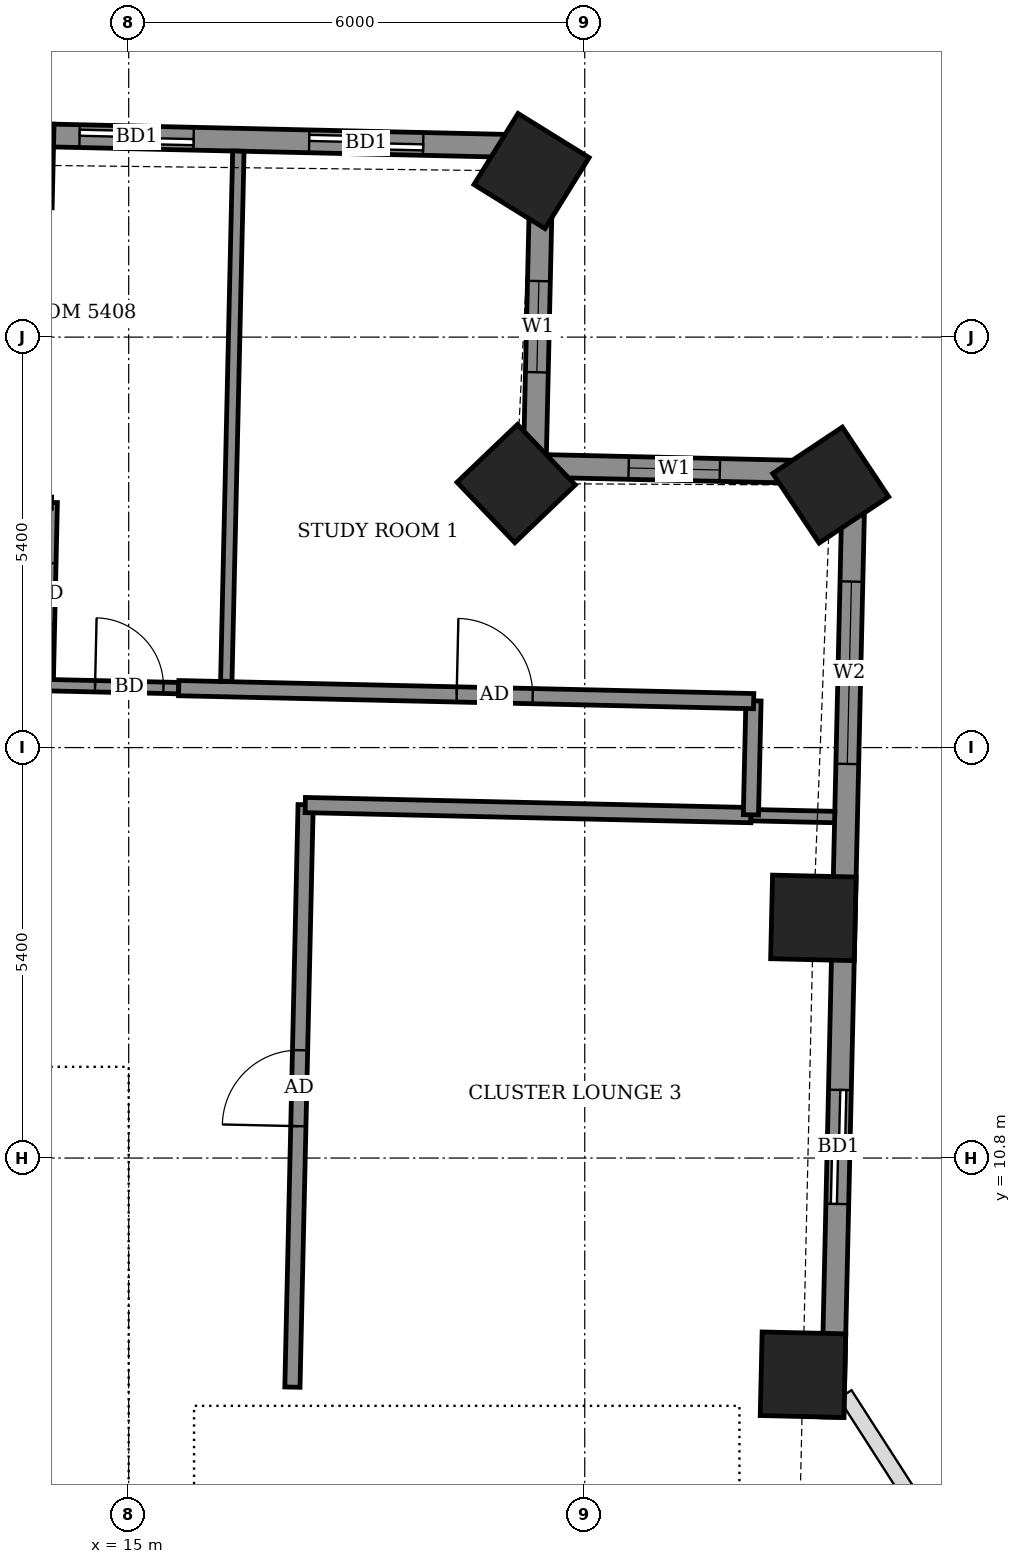
"""IFC4 building model, lengths in metres.
Left out: names, types, materials, properties, quantities, classifications, styles, units other than length and angle.
Written with IfcOpenShell. Run it as: python <this file> out.ifc"""

import sys

from ifc_helpers import new_model, si_unit, direction, frame, frame_2d, origin, origin_2d, place, context, subcontext, project, spatial, rectangle, extrude, element, fill, save


model = new_model("IFC4")
c1 = context("Model", 3, precision=1e-05, world=origin(), true_north=direction((0.0, 1.0)))
c2 = subcontext(c1, "Body", "Model", "MODEL_VIEW")
j1 = project(units=[si_unit("LENGTHUNIT", "METRE"), si_unit("PLANEANGLEUNIT", "RADIAN")], contexts=[c1])
p1 = place(None, origin())
s1 = spatial("IfcSite", under=j1, at=p1, CompositionType="ELEMENT")
p2 = place(p1, origin())
s2 = spatial("IfcBuilding", under=s1, at=p2, CompositionType="ELEMENT")
p3 = place(p2, frame((0.0, 0.0, 212.3)))
s3 = spatial("IfcBuildingStorey", under=s2, at=p3, CompositionType="ELEMENT", Elevation=212.3)
for number, where, z_axis, x_axis in (
    (1, (23.871, 7.949, -0.55), (0.0, 0.0, 1.0), (0.023, 1.0, 0.0)),
    (2, (24.008, 13.959, -0.55), (0.0, 0.0, 1.0), (0.023, 1.0, 0.0)),
    (3, (24.236, 19.653, -0.55), (0.0, 0.0, 1.0), (-0.554, 0.833, 0.0)),
    (4, (20.097, 19.673, -0.55), (0.0, 0.0, 1.0), (-0.691, 0.723, 0.0)),
    (5, (20.3, 23.785, -0.55), (0.0, 0.0, 1.0), (-0.85, 0.527, 0.0)),
    (6, (13.456, 23.864, -0.55), (0.0, 0.0, 1.0), (-1.0, 0.023, 0.0)),
):
    element("IfcColumn", number, at=place(p3, frame(where, z_axis=z_axis, x_axis=x_axis)), inside=s3, PredefinedType="COLUMN", context=c2, shape_type="SweptSolid", body=[
        extrude(rectangle(XDim=1.1, YDim=1.1, at=origin_2d()), origin(), (0.0, 0.0, 1.0), 3.6),
    ])
p4 = place(p3, frame((24.259, 7.391, 0.0), z_axis=(0.0, 0.0, 1.0), x_axis=(0.022696408441, 0.999742403344, 0.0)))
e7 = element("IfcWall", 7, at=p4, inside=s3, PredefinedType="SOLIDWALL", context=c2, shape_type="SweptSolid", body=[
    extrude(rectangle(XDim=12.424, YDim=0.3, at=frame_2d((6.212, 0.0))), origin(), (0.0, 0.0, 1.0), 2.55),
])
p5 = place(p4, frame((2.806, 0.0, 0.0)))
e8 = element("IfcOpeningElement", 8, at=p5, cuts=e7, PredefinedType="OPENING", context=c2, shape_type="SweptSolid", body=[
    extrude(rectangle(XDim=1.5, YDim=2.4, at=frame_2d((0.75, 1.2))), frame((0.0, 0.16, 0.0), z_axis=(0.0, -1.0, 0.0), x_axis=(1.0, 0.0, 0.0)), (0.0, 0.0, 1.0), 0.32),
])
p6 = place(p4, frame((8.596, 0.0, 0.9)))
e9 = element("IfcOpeningElement", 9, at=p6, cuts=e7, PredefinedType="OPENING", context=c2, shape_type="SweptSolid", body=[
    extrude(rectangle(XDim=2.4, YDim=1.5, at=frame_2d((1.2, 0.75))), frame((0.0, 0.16, 0.0), z_axis=(0.0, -1.0, 0.0), x_axis=(1.0, 0.0, 0.0)), (0.0, 0.0, 1.0), 0.32),
])
p7 = place(p3, frame((24.541, 19.812, 0.0), z_axis=(0.0, 0.0, 1.0), x_axis=(-0.999744320311, 0.022611811187, 0.0)))
e10 = element("IfcWall", 10, at=p7, inside=s3, PredefinedType="SOLIDWALL", context=c2, shape_type="SweptSolid", body=[
    extrude(rectangle(XDim=4.2, YDim=0.3, at=frame_2d((2.1, 0.0))), origin(), (0.0, 0.0, 1.0), 2.55),
])
p8 = place(p7, frame((1.764, 0.0, 0.9)))
e11 = element("IfcOpeningElement", 11, at=p8, cuts=e10, PredefinedType="OPENING", context=c2, shape_type="SweptSolid", body=[
    extrude(rectangle(XDim=1.2, YDim=1.5, at=frame_2d((0.6, 0.75))), frame((0.0, 0.16, 0.0), z_axis=(0.0, -1.0, 0.0), x_axis=(1.0, 0.0, 0.0)), (0.0, 0.0, 1.0), 0.32),
])
p9 = place(p3, frame((20.342, 19.907, 0.0), z_axis=(0.0, 0.0, 1.0), x_axis=(0.022611811187, 0.999744320311, 0.0)))
e12 = element("IfcWall", 12, at=p9, inside=s3, PredefinedType="SOLIDWALL", context=c2, shape_type="SweptSolid", body=[
    extrude(rectangle(XDim=4.2, YDim=0.3, at=frame_2d((2.1, 0.0))), origin(), (0.0, 0.0, 1.0), 2.55),
])
p10 = place(p9, frame((1.231, 0.0, 0.9)))
e13 = element("IfcOpeningElement", 13, at=p10, cuts=e12, PredefinedType="OPENING", context=c2, shape_type="SweptSolid", body=[
    extrude(rectangle(XDim=1.2, YDim=1.5, at=frame_2d((0.6, 0.75))), frame((0.0, 0.16, 0.0), z_axis=(0.0, -1.0, 0.0), x_axis=(1.0, 0.0, 0.0)), (0.0, 0.0, 1.0), 0.32),
])
p11 = place(p3, frame((20.437, 24.106, 0.0), z_axis=(0.0, 0.0, 1.0), x_axis=(-0.999742506232, 0.022691875925, 0.0)))
e14 = element("IfcWall", 14, at=p11, inside=s3, PredefinedType="SOLIDWALL", context=c2, shape_type="SweptSolid", body=[
    extrude(rectangle(XDim=42.444, YDim=0.3, at=frame_2d((21.222, 0.0))), origin(), (0.0, 0.0, 1.0), 2.55),
])
p12 = place(p11, frame((1.563, 0.0, 0.0)))
e15 = element("IfcOpeningElement", 15, at=p12, cuts=e14, PredefinedType="OPENING", context=c2, shape_type="SweptSolid", body=[
    extrude(rectangle(XDim=1.5, YDim=2.4, at=frame_2d((0.75, 1.2))), frame((0.0, 0.16, 0.0), z_axis=(0.0, -1.0, 0.0), x_axis=(1.0, 0.0, 0.0)), (0.0, 0.0, 1.0), 0.32),
])
p13 = place(p11, frame((4.584, 0.0, 0.0)))
e16 = element("IfcOpeningElement", 16, at=p13, cuts=e14, PredefinedType="OPENING", context=c2, shape_type="SweptSolid", body=[
    extrude(rectangle(XDim=1.5, YDim=2.4, at=frame_2d((0.75, 1.2))), frame((0.0, 0.16, 0.0), z_axis=(0.0, -1.0, 0.0), x_axis=(1.0, 0.0, 0.0)), (0.0, 0.0, 1.0), 0.32),
])
p14 = place(p11, frame((10.269, 0.0, 0.0)))
e17 = element("IfcOpeningElement", 17, at=p14, cuts=e14, PredefinedType="OPENING", context=c2, shape_type="SweptSolid", body=[
    extrude(rectangle(XDim=1.5, YDim=2.4, at=frame_2d((0.75, 1.2))), frame((0.0, 0.16, 0.0), z_axis=(0.0, -1.0, 0.0), x_axis=(1.0, 0.0, 0.0)), (0.0, 0.0, 1.0), 0.32),
])
p15 = place(p11, frame((15.271, 0.0, 0.0)))
e18 = element("IfcOpeningElement", 18, at=p15, cuts=e14, PredefinedType="OPENING", context=c2, shape_type="SweptSolid", body=[
    extrude(rectangle(XDim=1.5, YDim=2.4, at=frame_2d((0.75, 1.2))), frame((0.0, 0.16, 0.0), z_axis=(0.0, -1.0, 0.0), x_axis=(1.0, 0.0, 0.0)), (0.0, 0.0, 1.0), 0.32),
])
p16 = place(p11, frame((18.533, 0.0, 0.0)))
e19 = element("IfcOpeningElement", 19, at=p16, cuts=e14, PredefinedType="OPENING", context=c2, shape_type="SweptSolid", body=[
    extrude(rectangle(XDim=1.5, YDim=2.4, at=frame_2d((0.75, 1.2))), frame((0.0, 0.16, 0.0), z_axis=(0.0, -1.0, 0.0), x_axis=(1.0, 0.0, 0.0)), (0.0, 0.0, 1.0), 0.32),
])
p17 = place(p11, frame((23.819, 0.0, 0.0)))
e20 = element("IfcOpeningElement", 20, at=p17, cuts=e14, PredefinedType="OPENING", context=c2, shape_type="SweptSolid", body=[
    extrude(rectangle(XDim=1.5, YDim=2.4, at=frame_2d((0.75, 1.2))), frame((0.0, 0.16, 0.0), z_axis=(0.0, -1.0, 0.0), x_axis=(1.0, 0.0, 0.0)), (0.0, 0.0, 1.0), 0.32),
])
p18 = place(p11, frame((29.345, 0.0, 0.0)))
e21 = element("IfcOpeningElement", 21, at=p18, cuts=e14, PredefinedType="OPENING", context=c2, shape_type="SweptSolid", body=[
    extrude(rectangle(XDim=1.5, YDim=2.4, at=frame_2d((0.75, 1.2))), frame((0.0, 0.16, 0.0), z_axis=(0.0, -1.0, 0.0), x_axis=(1.0, 0.0, 0.0)), (0.0, 0.0, 1.0), 0.32),
])
p19 = place(p11, frame((32.607, 0.0, 0.0)))
e22 = element("IfcOpeningElement", 22, at=p19, cuts=e14, PredefinedType="OPENING", context=c2, shape_type="SweptSolid", body=[
    extrude(rectangle(XDim=1.5, YDim=2.4, at=frame_2d((0.75, 1.2))), frame((0.0, 0.16, 0.0), z_axis=(0.0, -1.0, 0.0), x_axis=(1.0, 0.0, 0.0)), (0.0, 0.0, 1.0), 0.32),
])
p20 = place(p11, frame((37.783, 0.0, 0.9)))
e23 = element("IfcOpeningElement", 23, at=p20, cuts=e14, PredefinedType="OPENING", context=c2, shape_type="SweptSolid", body=[
    extrude(rectangle(XDim=2.4, YDim=1.5, at=frame_2d((1.2, 0.75))), frame((0.0, 0.16, 0.0), z_axis=(0.0, -1.0, 0.0), x_axis=(1.0, 0.0, 0.0)), (0.0, 0.0, 1.0), 0.32),
])
p21 = place(p3, frame((17.154, 7.786, 0.0), z_axis=(0.0, 0.0, 1.0), x_axis=(0.022680883318, 0.999742755679, 0.0)))
e24 = element("IfcWall", 24, at=p21, inside=s3, PredefinedType="PARTITIONING", context=c2, shape_type="SweptSolid", body=[
    extrude(rectangle(XDim=7.664, YDim=0.2, at=frame_2d((3.832, 0.0))), origin(), (0.0, 0.0, 1.0), 3.05),
])
p22 = place(p21, frame((3.434, 0.0, 0.0)))
e25 = element("IfcOpeningElement", 25, at=p22, cuts=e24, PredefinedType="OPENING", context=c2, shape_type="SweptSolid", body=[
    extrude(rectangle(XDim=1.0, YDim=2.1, at=frame_2d((0.5, 1.05))), frame((0.0, 0.11, 0.0), z_axis=(0.0, -1.0, 0.0), x_axis=(1.0, 0.0, 0.0)), (0.0, 0.0, 1.0), 0.22),
])
p23 = place(p3, frame((17.323, 15.444, 0.0), z_axis=(0.0, 0.0, 1.0), x_axis=(0.999742758565, -0.022680756085, 0.0)))
e26 = element("IfcWall", 26, at=p23, inside=s3, PredefinedType="PARTITIONING", context=c2, shape_type="SweptSolid", body=[
    extrude(rectangle(XDim=5.866, YDim=0.2, at=frame_2d((2.933, 0.0))), origin(), (0.0, 0.0, 1.0), 3.05),
])
p24 = place(p3, frame((23.188, 15.311, 0.0), z_axis=(0.0, 0.0, 1.0), x_axis=(0.999738848859, -0.022852441507, 0.0)))
e27 = element("IfcWall", 27, at=p24, inside=s3, PredefinedType="PARTITIONING", context=c2, shape_type="SweptSolid", body=[
    extrude(rectangle(XDim=1.1, YDim=0.15, at=frame_2d((0.55, 0.0))), origin(), (0.0, 0.0, 1.0), 2.55),
])
p25 = place(p3, frame((23.186, 15.315, 0.0), z_axis=(0.0, 0.0, 1.0), x_axis=(0.022617910375, 0.999744182344, 0.0)))
e28 = element("IfcWall", 28, at=p25, inside=s3, PredefinedType="PARTITIONING", context=c2, shape_type="SweptSolid", body=[
    extrude(rectangle(XDim=1.5, YDim=0.2, at=frame_2d((0.75, 0.0))), origin(), (0.0, 0.0, 1.0), 3.05),
])
p26 = place(p3, frame((-14.871, 17.675, 0.0), z_axis=(0.0, 0.0, 1.0), x_axis=(0.999742359486, -0.02269834024, 0.0)))
e29 = element("IfcWall", 29, at=p26, inside=s3, PredefinedType="PARTITIONING", context=c2, shape_type="SweptSolid", body=[
    extrude(rectangle(XDim=30.536, YDim=0.15, at=frame_2d((15.268, 0.0))), origin(), (0.0, 0.0, 1.0), 3.05),
])
p27 = place(p26, frame((29.436, 0.0, 0.0)))
e30 = element("IfcOpeningElement", 30, at=p27, cuts=e29, PredefinedType="OPENING", context=c2, shape_type="SweptSolid", body=[
    extrude(rectangle(XDim=0.9, YDim=2.1, at=frame_2d((0.45, 1.05))), frame((0.0, 0.085, 0.0), z_axis=(0.0, -1.0, 0.0), x_axis=(1.0, 0.0, 0.0)), (0.0, 0.0, 1.0), 0.17),
])
p28 = place(p26, frame((22.484, 0.0, 0.0)))
e31 = element("IfcOpeningElement", 31, at=p28, cuts=e29, PredefinedType="OPENING", context=c2, shape_type="SweptSolid", body=[
    extrude(rectangle(XDim=0.9, YDim=2.1, at=frame_2d((0.45, 1.05))), frame((0.0, 0.085, 0.0), z_axis=(0.0, -1.0, 0.0), x_axis=(1.0, 0.0, 0.0)), (0.0, 0.0, 1.0), 0.17),
])
p29 = place(p26, frame((20.434, 0.0, 0.0)))
e32 = element("IfcOpeningElement", 32, at=p29, cuts=e29, PredefinedType="OPENING", context=c2, shape_type="SweptSolid", body=[
    extrude(rectangle(XDim=0.9, YDim=2.1, at=frame_2d((0.45, 1.05))), frame((0.0, 0.085, 0.0), z_axis=(0.0, -1.0, 0.0), x_axis=(1.0, 0.0, 0.0)), (0.0, 0.0, 1.0), 0.17),
])
p30 = place(p26, frame((13.484, 0.0, 0.0)))
e33 = element("IfcOpeningElement", 33, at=p30, cuts=e29, PredefinedType="OPENING", context=c2, shape_type="SweptSolid", body=[
    extrude(rectangle(XDim=0.9, YDim=2.1, at=frame_2d((0.45, 1.05))), frame((0.0, 0.085, 0.0), z_axis=(0.0, -1.0, 0.0), x_axis=(1.0, 0.0, 0.0)), (0.0, 0.0, 1.0), 0.17),
])
p31 = place(p26, frame((11.334, 0.0, 0.0)))
e34 = element("IfcOpeningElement", 34, at=p31, cuts=e29, PredefinedType="OPENING", context=c2, shape_type="SweptSolid", body=[
    extrude(rectangle(XDim=0.9, YDim=2.1, at=frame_2d((0.45, 1.05))), frame((0.0, 0.085, 0.0), z_axis=(0.0, -1.0, 0.0), x_axis=(1.0, 0.0, 0.0)), (0.0, 0.0, 1.0), 0.17),
])
p32 = place(p26, frame((4.359, 0.0, 0.0)))
e35 = element("IfcOpeningElement", 35, at=p32, cuts=e29, PredefinedType="OPENING", context=c2, shape_type="SweptSolid", body=[
    extrude(rectangle(XDim=0.9, YDim=2.1, at=frame_2d((0.45, 1.05))), frame((0.0, 0.085, 0.0), z_axis=(0.0, -1.0, 0.0), x_axis=(1.0, 0.0, 0.0)), (0.0, 0.0, 1.0), 0.17),
])
p33 = place(p26, frame((2.009, 0.0, 0.0)))
e36 = element("IfcOpeningElement", 36, at=p33, cuts=e29, PredefinedType="OPENING", context=c2, shape_type="SweptSolid", body=[
    extrude(rectangle(XDim=0.9, YDim=2.1, at=frame_2d((0.45, 1.05))), frame((0.0, 0.085, 0.0), z_axis=(0.0, -1.0, 0.0), x_axis=(1.0, 0.0, 0.0)), (0.0, 0.0, 1.0), 0.17),
])
p34 = place(p3, frame((15.658, 16.982, 0.0), z_axis=(0.0, 0.0, 1.0), x_axis=(0.99974485859, -0.022587999516, 0.0)))
e37 = element("IfcWall", 37, at=p34, inside=s3, PredefinedType="PARTITIONING", context=c2, shape_type="SweptSolid", body=[
    extrude(rectangle(XDim=7.566, YDim=0.2, at=frame_2d((3.783, 0.0))), origin(), (0.0, 0.0, 1.0), 3.05),
])
p35 = place(p34, frame((3.658, 0.0, 0.0)))
e38 = element("IfcOpeningElement", 38, at=p35, cuts=e37, PredefinedType="OPENING", context=c2, shape_type="SweptSolid", body=[
    extrude(rectangle(XDim=1.0, YDim=2.1, at=frame_2d((0.5, 1.05))), frame((0.0, 0.11, 0.0), z_axis=(0.0, -1.0, 0.0), x_axis=(1.0, 0.0, 0.0)), (0.0, 0.0, 1.0), 0.22),
])
p36 = place(p3, frame((13.935, 17.101, 0.0), z_axis=(0.0, 0.0, 1.0), x_axis=(0.022370700241, 0.999749744571, 0.0)))
e39 = element("IfcWall", 39, at=p36, inside=s3, PredefinedType="PARTITIONING", context=c2, shape_type="SweptSolid", body=[
    extrude(rectangle(XDim=2.324, YDim=0.15, at=frame_2d((1.162, 0.0))), origin(), (0.0, 0.0, 1.0), 3.05),
])
p37 = place(p36, frame((0.725, 0.0, 0.0)))
e40 = element("IfcOpeningElement", 40, at=p37, cuts=e39, PredefinedType="OPENING", context=c2, shape_type="SweptSolid", body=[
    extrude(rectangle(XDim=0.8, YDim=2.1, at=frame_2d((0.4, 1.05))), frame((0.0, 0.085, 0.0), z_axis=(0.0, -1.0, 0.0), x_axis=(1.0, 0.0, 0.0)), (0.0, 0.0, 1.0), 0.17),
])
p38 = place(p3, frame((16.284, 17.072, 0.0), z_axis=(0.0, 0.0, 1.0), x_axis=(0.022815200701, 0.99973969943, 0.0)))
e41 = element("IfcWall", 41, at=p38, inside=s3, PredefinedType="PARTITIONING", context=c2, shape_type="SweptSolid", body=[
    extrude(rectangle(XDim=6.977, YDim=0.15, at=frame_2d((3.488, 0.0))), origin(), (0.0, 0.0, 1.0), 2.55),
])
p39 = place(p3, frame((-14.6, 11.2, 0.0), z_axis=(0.0, 0.0, 1.0), x_axis=(1.0, 0.0, 0.0)))
e42 = element("IfcWall", 42, at=p39, inside=s3, PredefinedType="SHEAR", context=c2, shape_type="SweptSolid", body=[
    extrude(rectangle(XDim=29.2, YDim=0.8, at=frame_2d((14.6, 0.0))), origin(), (0.0, 0.0, 1.0), 3.6),
])
p40 = place(p3, frame((14.2, -10.8, 0.0), z_axis=(0.0, 0.0, 1.0), x_axis=(0.0, 1.0, 0.0)))
e43 = element("IfcWall", 43, at=p40, inside=s3, PredefinedType="SHEAR", context=c2, shape_type="SweptSolid", body=[
    extrude(rectangle(XDim=21.6, YDim=0.8, at=frame_2d((10.8, 0.0))), origin(), (0.0, 0.0, 1.0), 3.6),
])
p41 = place(p40, frame((1.2, 0.0, 0.0)))
e44 = element("IfcOpeningElement", 44, at=p41, cuts=e43, PredefinedType="OPENING", context=c2, shape_type="SweptSolid", body=[
    extrude(rectangle(XDim=1.2, YDim=2.1, at=frame_2d((0.6, 1.05))), frame((0.0, 0.41, 0.0), z_axis=(0.0, -1.0, 0.0), x_axis=(1.0, 0.0, 0.0)), (0.0, 0.0, 1.0), 0.82),
])
p42 = place(p5, origin())
e45 = element("IfcDoor", 45, at=p42, inside=s3, OperationType="SLIDING_TO_LEFT", PredefinedType="DOOR", context=c2, shape_type="SweptSolid", body=[
    extrude(rectangle(XDim=1.5, YDim=2.4, at=frame_2d((0.75, 1.2))), frame((0.0, 0.025, 0.0), z_axis=(0.0, -1.0, 0.0), x_axis=(1.0, 0.0, 0.0)), (0.0, 0.0, 1.0), 0.05),
])
fill(e8, e45)
p43 = place(p6, origin())
e46 = element("IfcWindow", 46, at=p43, inside=s3, PartitioningType="DOUBLE_PANEL_VERTICAL", PredefinedType="WINDOW", context=c2, shape_type="SweptSolid", body=[
    extrude(rectangle(XDim=2.4, YDim=1.5, at=frame_2d((1.2, 0.75))), frame((0.0, 0.03, 0.0), z_axis=(0.0, -1.0, 0.0), x_axis=(1.0, 0.0, 0.0)), (0.0, 0.0, 1.0), 0.06),
])
fill(e9, e46)
p44 = place(p8, origin())
e47 = element("IfcWindow", 47, at=p44, inside=s3, PartitioningType="SINGLE_PANEL", PredefinedType="WINDOW", context=c2, shape_type="SweptSolid", body=[
    extrude(rectangle(XDim=1.2, YDim=1.5, at=frame_2d((0.6, 0.75))), frame((0.0, 0.03, 0.0), z_axis=(0.0, -1.0, 0.0), x_axis=(1.0, 0.0, 0.0)), (0.0, 0.0, 1.0), 0.06),
])
fill(e11, e47)
p45 = place(p10, origin())
e48 = element("IfcWindow", 48, at=p45, inside=s3, PartitioningType="SINGLE_PANEL", PredefinedType="WINDOW", context=c2, shape_type="SweptSolid", body=[
    extrude(rectangle(XDim=1.2, YDim=1.5, at=frame_2d((0.6, 0.75))), frame((0.0, 0.03, 0.0), z_axis=(0.0, -1.0, 0.0), x_axis=(1.0, 0.0, 0.0)), (0.0, 0.0, 1.0), 0.06),
])
fill(e13, e48)
p46 = place(p12, origin())
e49 = element("IfcDoor", 49, at=p46, inside=s3, OperationType="SLIDING_TO_LEFT", PredefinedType="DOOR", context=c2, shape_type="SweptSolid", body=[
    extrude(rectangle(XDim=1.5, YDim=2.4, at=frame_2d((0.75, 1.2))), frame((0.0, 0.025, 0.0), z_axis=(0.0, -1.0, 0.0), x_axis=(1.0, 0.0, 0.0)), (0.0, 0.0, 1.0), 0.05),
])
fill(e15, e49)
p47 = place(p13, origin())
e50 = element("IfcDoor", 50, at=p47, inside=s3, OperationType="SLIDING_TO_LEFT", PredefinedType="DOOR", context=c2, shape_type="SweptSolid", body=[
    extrude(rectangle(XDim=1.5, YDim=2.4, at=frame_2d((0.75, 1.2))), frame((0.0, 0.025, 0.0), z_axis=(0.0, -1.0, 0.0), x_axis=(1.0, 0.0, 0.0)), (0.0, 0.0, 1.0), 0.05),
])
fill(e16, e50)
p48 = place(p22, origin())
e51 = element("IfcDoor", 51, at=p48, inside=s3, OperationType="SINGLE_SWING_RIGHT", PredefinedType="DOOR", context=c2, shape_type="SweptSolid", body=[
    extrude(rectangle(XDim=1.0, YDim=2.1, at=frame_2d((0.5, 1.05))), frame((0.0, 0.025, 0.0), z_axis=(0.0, -1.0, 0.0), x_axis=(1.0, 0.0, 0.0)), (0.0, 0.0, 1.0), 0.05),
])
fill(e25, e51)
p49 = place(p35, origin())
e52 = element("IfcDoor", 52, at=p49, inside=s3, OperationType="SINGLE_SWING_LEFT", PredefinedType="DOOR", context=c2, shape_type="SweptSolid", body=[
    extrude(rectangle(XDim=1.0, YDim=2.1, at=frame_2d((0.5, 1.05))), frame((0.0, 0.025, 0.0), z_axis=(0.0, -1.0, 0.0), x_axis=(1.0, 0.0, 0.0)), (0.0, 0.0, 1.0), 0.05),
])
fill(e38, e52)
p50 = place(p27, origin())
e53 = element("IfcDoor", 53, at=p50, inside=s3, OperationType="SINGLE_SWING_RIGHT", PredefinedType="DOOR", context=c2, shape_type="SweptSolid", body=[
    extrude(rectangle(XDim=0.9, YDim=2.1, at=frame_2d((0.45, 1.05))), frame((0.0, 0.025, 0.0), z_axis=(0.0, -1.0, 0.0), x_axis=(1.0, 0.0, 0.0)), (0.0, 0.0, 1.0), 0.05),
])
fill(e30, e53)
save(model, sys.argv[1])
